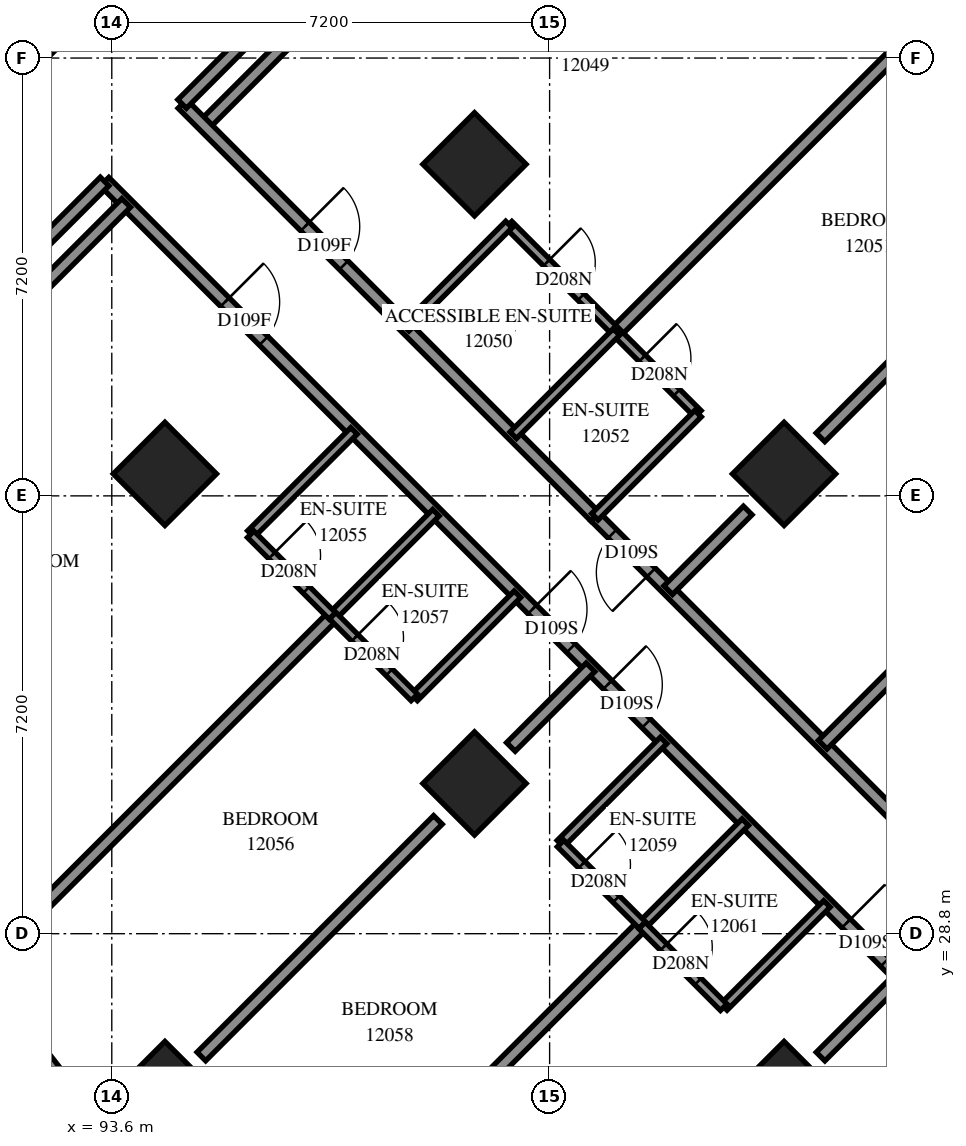
"""IFC4 building model, lengths in metres.
Left out: names, types, materials, properties, quantities, classifications, styles, units other than length and angle.
Written with IfcOpenShell. Run it as: python <this file> out.ifc"""

import sys

from ifc_helpers import new_model, si_unit, direction, frame, frame_2d, origin, origin_2d, place, context, subcontext, project, spatial, polyline, rectangle, outline, extrude, element, fill, save


model = new_model("IFC4")
c1 = context("Model", 3, precision=1e-05, world=origin(), true_north=direction((0.0, 1.0)))
c2 = subcontext(c1, "Body", "Model", "MODEL_VIEW")
j1 = project(units=[si_unit("LENGTHUNIT", "METRE"), si_unit("PLANEANGLEUNIT", "RADIAN")], contexts=[c1])
p1 = place(None, origin())
s1 = spatial("IfcSite", under=j1, at=p1, CompositionType="ELEMENT")
p2 = place(p1, origin())
s2 = spatial("IfcBuilding", under=s1, at=p2, CompositionType="ELEMENT")
p3 = place(p2, frame((0.0, 0.0, 47.4)))
s3 = spatial("IfcBuildingStorey", under=s2, at=p3, CompositionType="ELEMENT", Elevation=47.4)
for number, where, z_axis, x_axis in (
    (1, (99.565, 41.453, 0.0), (0.0, 0.0, 1.0), (0.707, -0.707, 0.0)),
    (2, (94.474, 36.362, 0.0), (0.0, 0.0, 1.0), (0.707, -0.707, 0.0)),
    (3, (104.656, 36.362, 0.0), (0.0, 0.0, 1.0), (0.707, -0.707, 0.0)),
    (4, (99.565, 31.271, 0.0), (0.0, 0.0, 1.0), (0.707, -0.707, 0.0)),
    (5, (94.474, 26.18, 0.0), (0.0, 0.0, 1.0), (0.707, -0.707, 0.0)),
    (6, (104.656, 26.18, 0.0), (0.0, 0.0, 1.0), (0.707, -0.707, 0.0)),
):
    element("IfcColumn", number, at=place(p3, frame(where, z_axis=z_axis, x_axis=x_axis)), inside=s3, PredefinedType="COLUMN", context=c2, shape_type="SweptSolid", body=[
        extrude(rectangle(XDim=1.2, YDim=1.2, at=origin_2d()), origin(), (0.0, 0.0, 1.0), 3.1),
    ])
p4 = place(p3, frame((87.19, 38.554, -0.3), z_axis=(0.0, 0.0, 1.0), x_axis=(0.707103309, 0.7071102534, 0.0)))
e7 = element("IfcWall", 7, at=p4, inside=s3, PredefinedType="SHEAR", context=c2, shape_type="SweptSolid", body=[
    extrude(rectangle(XDim=14.4, YDim=1.0, at=frame_2d((7.2, 0.0))), origin(), (0.0, 0.0, 1.0), 2.7),
])
p5 = place(p4, frame((4.55, 0.0, 0.3)))
e8 = element("IfcOpeningElement", 8, at=p5, cuts=e7, PredefinedType="OPENING", context=c2, shape_type="SweptSolid", body=[
    extrude(rectangle(XDim=1.1, YDim=2.1, at=frame_2d((0.55, 1.05))), frame((0.0, 0.51, 0.0), z_axis=(0.0, -1.0, 0.0), x_axis=(1.0, 0.0, 0.0)), (0.0, 0.0, 1.0), 1.02),
])
p6 = place(p4, frame((11.35, 0.0, 0.3)))
e9 = element("IfcOpeningElement", 9, at=p6, cuts=e7, PredefinedType="OPENING", context=c2, shape_type="SweptSolid", body=[
    extrude(rectangle(XDim=1.1, YDim=2.1, at=frame_2d((0.55, 1.05))), frame((0.0, 0.51, 0.0), z_axis=(0.0, -1.0, 0.0), x_axis=(1.0, 0.0, 0.0)), (0.0, 0.0, 1.0), 1.02),
])
p7 = place(p3, frame((91.16, 28.188, 0.0), z_axis=(0.0, 0.0, 1.0), x_axis=(0.614334374, -0.7890458015, 0.0)))
e10 = element("IfcWall", 10, at=p7, inside=s3, PredefinedType="SOLIDWALL", context=c2, shape_type="SweptSolid", body=[
    extrude(outline(polyline([(0.034, -0.275), (3.937, -0.275), (3.868, 0.275), (-0.034, 0.275), (0.034, -0.275)])), origin(), (0.0, 0.0, 1.0), 3.1),
])
p8 = place(p7, frame((0.534, 0.0, 0.5)))
e11 = element("IfcOpeningElement", 11, at=p8, cuts=e10, PredefinedType="OPENING", context=c2, shape_type="SweptSolid", body=[
    extrude(rectangle(XDim=2.8, YDim=2.45, at=frame_2d((1.4, 1.225))), frame((0.0, 0.285, 0.0), z_axis=(0.0, -1.0, 0.0), x_axis=(1.0, 0.0, 0.0)), (0.0, 0.0, 1.0), 0.57),
])
p9 = place(p3, frame((93.481, 41.167, 0.0), z_axis=(0.0, 0.0, 1.0), x_axis=(0.7071067812, -0.7071067812, 0.0)))
e12 = element("IfcWall", 12, at=p9, inside=s3, PredefinedType="PARTITIONING", context=c2, shape_type="SweptSolid", body=[
    extrude(rectangle(XDim=25.699, YDim=0.2, at=frame_2d((12.85, 0.0))), origin(), (0.0, 0.0, 1.0), 3.1),
])
p10 = place(p9, frame((2.8, 0.0, 0.0)))
e13 = element("IfcOpeningElement", 13, at=p10, cuts=e12, PredefinedType="OPENING", context=c2, shape_type="SweptSolid", body=[
    extrude(rectangle(XDim=0.9, YDim=2.1, at=frame_2d((0.45, 1.05))), frame((0.0, 0.11, 0.0), z_axis=(0.0, -1.0, 0.0), x_axis=(1.0, 0.0, 0.0)), (0.0, 0.0, 1.0), 0.22),
])
p11 = place(p9, frame((9.948, 0.0, 0.0)))
e14 = element("IfcOpeningElement", 14, at=p11, cuts=e12, PredefinedType="OPENING", context=c2, shape_type="SweptSolid", body=[
    extrude(rectangle(XDim=0.9, YDim=2.1, at=frame_2d((0.45, 1.05))), frame((0.0, 0.11, 0.0), z_axis=(0.0, -1.0, 0.0), x_axis=(1.0, 0.0, 0.0)), (0.0, 0.0, 1.0), 0.22),
])
p12 = place(p9, frame((11.7, 0.0, 0.0)))
e15 = element("IfcOpeningElement", 15, at=p12, cuts=e12, PredefinedType="OPENING", context=c2, shape_type="SweptSolid", body=[
    extrude(rectangle(XDim=0.9, YDim=2.1, at=frame_2d((0.45, 1.05))), frame((0.0, 0.11, 0.0), z_axis=(0.0, -1.0, 0.0), x_axis=(1.0, 0.0, 0.0)), (0.0, 0.0, 1.0), 0.22),
])
p13 = place(p9, frame((17.25, 0.0, 0.0)))
e16 = element("IfcOpeningElement", 16, at=p13, cuts=e12, PredefinedType="OPENING", context=c2, shape_type="SweptSolid", body=[
    extrude(rectangle(XDim=0.9, YDim=2.1, at=frame_2d((0.45, 1.05))), frame((0.0, 0.11, 0.0), z_axis=(0.0, -1.0, 0.0), x_axis=(1.0, 0.0, 0.0)), (0.0, 0.0, 1.0), 0.22),
])
p14 = place(p9, frame((22.82, 0.0, 0.0)))
e17 = element("IfcOpeningElement", 17, at=p14, cuts=e12, PredefinedType="OPENING", context=c2, shape_type="SweptSolid", body=[
    extrude(rectangle(XDim=0.9, YDim=2.1, at=frame_2d((0.45, 1.05))), frame((0.0, 0.11, 0.0), z_axis=(0.0, -1.0, 0.0), x_axis=(1.0, 0.0, 0.0)), (0.0, 0.0, 1.0), 0.22),
])
p15 = place(p3, frame((111.352, 25.855, 0.0), z_axis=(0.0, 0.0, 1.0), x_axis=(-0.7070418597, 0.7071716967, 0.0)))
e18 = element("IfcWall", 18, at=p15, inside=s3, PredefinedType="PARTITIONING", context=c2, shape_type="SweptSolid", body=[
    extrude(rectangle(XDim=13.864, YDim=0.2, at=frame_2d((6.932, 0.0))), origin(), (0.0, 0.0, 1.0), 3.1),
])
p16 = place(p15, frame((12.564, 0.0, 0.0)))
e19 = element("IfcOpeningElement", 19, at=p16, cuts=e18, PredefinedType="OPENING", context=c2, shape_type="SweptSolid", body=[
    extrude(rectangle(XDim=0.9, YDim=2.1, at=frame_2d((0.45, 1.05))), frame((0.0, 0.11, 0.0), z_axis=(0.0, -1.0, 0.0), x_axis=(1.0, 0.0, 0.0)), (0.0, 0.0, 1.0), 0.22),
])
p17 = place(p15, frame((5.19, 0.0, 0.0)))
e20 = element("IfcOpeningElement", 20, at=p17, cuts=e18, PredefinedType="OPENING", context=c2, shape_type="SweptSolid", body=[
    extrude(rectangle(XDim=1.0, YDim=2.1, at=frame_2d((0.5, 1.05))), frame((0.0, 0.11, 0.0), z_axis=(0.0, -1.0, 0.0), x_axis=(1.0, 0.0, 0.0)), (0.0, 0.0, 1.0), 0.22),
])
p18 = place(p3, frame((105.292, 31.908, 0.0), z_axis=(0.0, 0.0, 1.0), x_axis=(0.7071067812, 0.7071067812, 0.0)))
e21 = element("IfcWall", 21, at=p18, inside=s3, PredefinedType="PARTITIONING", context=c2, shape_type="SweptSolid", body=[
    extrude(rectangle(XDim=10.979, YDim=0.2, at=frame_2d((5.49, 0.0))), origin(), (0.0, 0.0, 1.0), 3.1),
])
p19 = place(p3, frame((95.109, 42.091, 0.0), z_axis=(0.0, 0.0, 1.0), x_axis=(0.7071113741, 0.7071021882, 0.0)))
e22 = element("IfcWall", 22, at=p19, inside=s3, PredefinedType="PARTITIONING", context=c2, shape_type="SweptSolid", body=[
    extrude(rectangle(XDim=10.886, YDim=0.2, at=frame_2d((5.443, 0.0))), origin(), (0.0, 0.0, 1.0), 3.1),
])
p20 = place(p3, frame((86.317, 33.298, 0.0), z_axis=(0.0, 0.0, 1.0), x_axis=(0.7071020793, 0.7071114831, 0.0)))
e23 = element("IfcWall", 23, at=p20, inside=s3, PredefinedType="PARTITIONING", context=c2, shape_type="SweptSolid", body=[
    extrude(rectangle(XDim=10.634, YDim=0.2, at=frame_2d((5.317, 0.0))), origin(), (0.0, 0.0, 1.0), 3.1),
])
p21 = place(p3, frame((94.761, 42.446, 0.0), z_axis=(0.0, 0.0, 1.0), x_axis=(0.7071067812, -0.7071067812, 0.0)))
e24 = element("IfcWall", 24, at=p21, inside=s3, PredefinedType="PARTITIONING", context=c2, shape_type="SweptSolid", body=[
    extrude(rectangle(XDim=9.597, YDim=0.2, at=frame_2d((4.798, 0.0))), origin(), (0.0, 0.0, 1.0), 3.1),
])
p22 = place(p21, frame((2.851, 0.0, 0.0)))
e25 = element("IfcOpeningElement", 25, at=p22, cuts=e24, PredefinedType="OPENING", context=c2, shape_type="SweptSolid", body=[
    extrude(rectangle(XDim=0.9, YDim=2.1, at=frame_2d((0.45, 1.05))), frame((0.0, 0.11, 0.0), z_axis=(0.0, -1.0, 0.0), x_axis=(1.0, 0.0, 0.0)), (0.0, 0.0, 1.0), 0.22),
])
for number, where, z_axis, x_axis in (
    (26, (86.836, 34.524, 0.0), (0.0, 0.0, 1.0), (0.707, 0.707, 0.0)),
    (27, (94.757, 42.445, 0.0), (0.0, 0.0, 1.0), (0.707, 0.707, 0.0)),
):
    element("IfcWall", number, at=place(p3, frame(where, z_axis=z_axis, x_axis=x_axis)), inside=s3, PredefinedType="PARTITIONING", context=c2, shape_type="SweptSolid", body=[
        extrude(rectangle(XDim=9.399, YDim=0.2, at=frame_2d((4.699, 0.0))), origin(), (0.0, 0.0, 1.0), 3.1),
    ])
p23 = place(p3, frame((101.896, 38.698, 0.0), z_axis=(0.0, 0.0, 1.0), x_axis=(0.7072298261, 0.7069837149, 0.0)))
e28 = element("IfcWall", 28, at=p23, inside=s3, PredefinedType="PARTITIONING", context=c2, shape_type="SweptSolid", body=[
    extrude(rectangle(XDim=8.533, YDim=0.2, at=frame_2d((4.266, 0.0))), origin(), (0.0, 0.0, 1.0), 3.1),
])
p24 = place(p3, frame((96.528, 23.144, 0.0), z_axis=(0.0, 0.0, 1.0), x_axis=(0.7071067812, 0.7071067812, 0.0)))
e29 = element("IfcWall", 29, at=p24, inside=s3, PredefinedType="PARTITIONING", context=c2, shape_type="SweptSolid", body=[
    extrude(rectangle(XDim=8.195, YDim=0.2, at=frame_2d((4.098, 0.0))), origin(), (0.0, 0.0, 1.0), 3.1),
])
p25 = place(p3, frame((91.459, 28.251, 0.0), z_axis=(0.0, 0.0, 1.0), x_axis=(0.7072292176, 0.7069843236, 0.0)))
e30 = element("IfcWall", 30, at=p25, inside=s3, PredefinedType="PARTITIONING", context=c2, shape_type="SweptSolid", body=[
    extrude(rectangle(XDim=8.167, YDim=0.2, at=frame_2d((4.083, 0.0))), origin(), (0.0, 0.0, 1.0), 3.1),
])
p26 = place(p3, frame((105.255, 36.963, 0.0), z_axis=(0.0, 0.0, 1.0), x_axis=(0.7071067812, 0.7071067812, 0.0)))
e31 = element("IfcWall", 31, at=p26, inside=s3, PredefinedType="PARTITIONING", context=c2, shape_type="SweptSolid", body=[
    extrude(rectangle(XDim=5.504, YDim=0.2, at=frame_2d((2.752, 0.0))), origin(), (0.0, 0.0, 1.0), 3.1),
])
p27 = place(p3, frame((95.073, 26.781, 0.0), z_axis=(0.0, 0.0, 1.0), x_axis=(0.7071067812, 0.7071067812, 0.0)))
e32 = element("IfcWall", 32, at=p27, inside=s3, PredefinedType="PARTITIONING", context=c2, shape_type="SweptSolid", body=[
    extrude(rectangle(XDim=5.501, YDim=0.2, at=frame_2d((2.751, 0.0))), origin(), (0.0, 0.0, 1.0), 3.1),
])
p28 = place(p3, frame((100.126, 40.461, 0.0), z_axis=(0.0, 0.0, 1.0), x_axis=(0.7071067812, -0.7071067812, 0.0)))
e33 = element("IfcWall", 33, at=p28, inside=s3, PredefinedType="PARTITIONING", context=c2, shape_type="SweptSolid", body=[
    extrude(rectangle(XDim=4.401, YDim=0.15, at=frame_2d((2.2, 0.0))), origin(), (0.0, 0.0, 1.0), 3.1),
])
p29 = place(p28, frame((0.883, 0.0, 0.0)))
e34 = element("IfcOpeningElement", 34, at=p29, cuts=e33, PredefinedType="OPENING", context=c2, shape_type="SweptSolid", body=[
    extrude(rectangle(XDim=0.8, YDim=2.1, at=frame_2d((0.4, 1.05))), frame((0.0, 0.085, 0.0), z_axis=(0.0, -1.0, 0.0), x_axis=(1.0, 0.0, 0.0)), (0.0, 0.0, 1.0), 0.17),
])
p30 = place(p28, frame((3.108, 0.0, 0.0)))
e35 = element("IfcOpeningElement", 35, at=p30, cuts=e33, PredefinedType="OPENING", context=c2, shape_type="SweptSolid", body=[
    extrude(rectangle(XDim=0.8, YDim=2.1, at=frame_2d((0.4, 1.05))), frame((0.0, 0.085, 0.0), z_axis=(0.0, -1.0, 0.0), x_axis=(1.0, 0.0, 0.0)), (0.0, 0.0, 1.0), 0.17),
])
for number, where, z_axis, x_axis in (
    (36, (100.977, 30.281, 0.0), (0.0, 0.0, 1.0), (0.707, 0.707, 0.0)),
    (37, (98.573, 32.685, 0.0), (0.0, 0.0, 1.0), (0.707, 0.707, 0.0)),
):
    element("IfcWall", number, at=place(p3, frame(where, z_axis=z_axis, x_axis=x_axis)), inside=s3, PredefinedType="PARTITIONING", context=c2, shape_type="SweptSolid", body=[
        extrude(rectangle(XDim=2.401, YDim=0.15, at=frame_2d((1.201, 0.0))), origin(), (0.0, 0.0, 1.0), 3.1),
    ])
for number, where, z_axis, x_axis in (
    (38, (105.578, 25.682, 0.0), (0.0, 0.0, 1.0), (0.707, 0.708, 0.0)),
    (39, (97.234, 34.026, 0.0), (0.0, 0.0, 1.0), (0.707, 0.708, 0.0)),
    (40, (98.435, 38.765, 0.0), (0.0, 0.0, 1.0), (0.707, 0.708, 0.0)),
    (41, (100.203, 36.997, 0.0), (0.0, 0.0, 1.0), (0.707, 0.708, 0.0)),
):
    element("IfcWall", number, at=place(p3, frame(where, z_axis=z_axis, x_axis=x_axis)), inside=s3, PredefinedType="PARTITIONING", context=c2, shape_type="SweptSolid", body=[
        extrude(rectangle(XDim=2.4, YDim=0.15, at=frame_2d((1.2, 0.0))), origin(), (0.0, 0.0, 1.0), 3.1),
    ])
for number, where, z_axis, x_axis in (
    (42, (95.887, 35.373, 0.0), (0.0, 0.0, 1.0), (0.707, 0.707, 0.0)),
    (43, (101.545, 35.657, 0.0), (0.0, 0.0, 1.0), (0.707, 0.707, 0.0)),
    (44, (102.323, 28.939, 0.0), (0.0, 0.0, 1.0), (0.707, 0.707, 0.0)),
    (45, (103.665, 27.595, 0.0), (0.0, 0.0, 1.0), (0.707, 0.707, 0.0)),
):
    element("IfcWall", number, at=place(p3, frame(where, z_axis=z_axis, x_axis=x_axis)), inside=s3, PredefinedType="PARTITIONING", context=c2, shape_type="SweptSolid", body=[
        extrude(rectangle(XDim=2.398, YDim=0.15, at=frame_2d((1.199, 0.0))), origin(), (0.0, 0.0, 1.0), 3.1),
    ])
p31 = place(p3, frame((95.885, 35.369, 0.0), z_axis=(0.0, 0.0, 1.0), x_axis=(0.7071067812, -0.7071067812, 0.0)))
e46 = element("IfcWall", 46, at=p31, inside=s3, PredefinedType="PARTITIONING", context=c2, shape_type="SweptSolid", body=[
    extrude(rectangle(XDim=1.901, YDim=0.15, at=frame_2d((0.95, 0.0))), origin(), (0.0, 0.0, 1.0), 3.1),
])
p32 = place(p31, frame((0.493, 0.0, 0.0)))
e47 = element("IfcOpeningElement", 47, at=p32, cuts=e46, PredefinedType="OPENING", context=c2, shape_type="SweptSolid", body=[
    extrude(rectangle(XDim=0.8, YDim=2.1, at=frame_2d((0.4, 1.05))), frame((0.0, 0.085, 0.0), z_axis=(0.0, -1.0, 0.0), x_axis=(1.0, 0.0, 0.0)), (0.0, 0.0, 1.0), 0.17),
])
p33 = place(p3, frame((100.981, 30.283, 0.0), z_axis=(0.0, 0.0, 1.0), x_axis=(0.7076330979, -0.7065800724, 0.0)))
e48 = element("IfcWall", 48, at=p33, inside=s3, PredefinedType="PARTITIONING", context=c2, shape_type="SweptSolid", body=[
    extrude(rectangle(XDim=1.899, YDim=0.15, at=frame_2d((0.95, 0.0))), origin(), (0.0, 0.0, 1.0), 3.1),
])
p34 = place(p33, frame((0.493, 0.0, 0.0)))
e49 = element("IfcOpeningElement", 49, at=p34, cuts=e48, PredefinedType="OPENING", context=c2, shape_type="SweptSolid", body=[
    extrude(rectangle(XDim=0.8, YDim=2.1, at=frame_2d((0.4, 1.05))), frame((0.0, 0.085, 0.0), z_axis=(0.0, -1.0, 0.0), x_axis=(1.0, 0.0, 0.0)), (0.0, 0.0, 1.0), 0.17),
])
p35 = place(p3, frame((97.233, 34.029, 0.0), z_axis=(0.0, 0.0, 1.0), x_axis=(0.7065800724, -0.7076330979, 0.0)))
e50 = element("IfcWall", 50, at=p35, inside=s3, PredefinedType="PARTITIONING", context=c2, shape_type="SweptSolid", body=[
    extrude(rectangle(XDim=1.899, YDim=0.15, at=frame_2d((0.95, 0.0))), origin(), (0.0, 0.0, 1.0), 3.1),
])
p36 = place(p35, frame((0.515, 0.0, 0.0)))
e51 = element("IfcOpeningElement", 51, at=p36, cuts=e50, PredefinedType="OPENING", context=c2, shape_type="SweptSolid", body=[
    extrude(rectangle(XDim=0.8, YDim=2.1, at=frame_2d((0.4, 1.05))), frame((0.0, 0.085, 0.0), z_axis=(0.0, -1.0, 0.0), x_axis=(1.0, 0.0, 0.0)), (0.0, 0.0, 1.0), 0.17),
])
p37 = place(p3, frame((102.321, 28.935, 0.0), z_axis=(0.0, 0.0, 1.0), x_axis=(0.7065800724, -0.7076330979, 0.0)))
e52 = element("IfcWall", 52, at=p37, inside=s3, PredefinedType="PARTITIONING", context=c2, shape_type="SweptSolid", body=[
    extrude(rectangle(XDim=1.899, YDim=0.15, at=frame_2d((0.95, 0.0))), origin(), (0.0, 0.0, 1.0), 3.1),
])
p38 = place(p37, frame((0.501, 0.0, 0.0)))
e53 = element("IfcOpeningElement", 53, at=p38, cuts=e52, PredefinedType="OPENING", context=c2, shape_type="SweptSolid", body=[
    extrude(rectangle(XDim=0.8, YDim=2.1, at=frame_2d((0.4, 1.05))), frame((0.0, 0.085, 0.0), z_axis=(0.0, -1.0, 0.0), x_axis=(1.0, 0.0, 0.0)), (0.0, 0.0, 1.0), 0.17),
])
p39 = place(p3, frame((100.163, 31.871, 0.0), z_axis=(0.0, 0.0, 1.0), x_axis=(0.7071067812, 0.7071067812, 0.0)))
e54 = element("IfcWall", 54, at=p39, inside=s3, PredefinedType="PARTITIONING", context=c2, shape_type="SweptSolid", body=[
    extrude(rectangle(XDim=1.853, YDim=0.2, at=frame_2d((0.926, 0.0))), origin(), (0.0, 0.0, 1.0), 3.1),
])
for number, where, z_axis, x_axis in (
    (55, (105.256, 26.78, 0.0), (0.0, 0.0, 1.0), (0.708, 0.707, 0.0)),
    (56, (102.75, 34.45, 0.0), (0.0, 0.0, 1.0), (0.707, 0.708, 0.0)),
):
    element("IfcWall", number, at=place(p3, frame(where, z_axis=z_axis, x_axis=x_axis)), inside=s3, PredefinedType="PARTITIONING", context=c2, shape_type="SweptSolid", body=[
        extrude(rectangle(XDim=1.851, YDim=0.2, at=frame_2d((0.926, 0.0))), origin(), (0.0, 0.0, 1.0), 3.1),
    ])
p40 = place(p8, origin())
e57 = element("IfcWindow", 57, at=p40, inside=s3, PartitioningType="SINGLE_PANEL", PredefinedType="WINDOW", context=c2, shape_type="SweptSolid", body=[
    extrude(rectangle(XDim=2.8, YDim=2.45, at=frame_2d((1.4, 1.225))), frame((0.0, 0.155, 0.0), z_axis=(0.0, -1.0, 0.0), x_axis=(1.0, 0.0, 0.0)), (0.0, 0.0, 1.0), 0.06),
])
fill(e11, e57)
p41 = place(p22, origin())
e58 = element("IfcDoor", 58, at=p41, inside=s3, OperationType="SINGLE_SWING_RIGHT", PredefinedType="DOOR", context=c2, shape_type="SweptSolid", body=[
    extrude(rectangle(XDim=0.9, YDim=2.1, at=frame_2d((0.45, 1.05))), frame((0.0, 0.025, 0.0), z_axis=(0.0, -1.0, 0.0), x_axis=(1.0, 0.0, 0.0)), (0.0, 0.0, 1.0), 0.05),
])
fill(e25, e58)
p42 = place(p29, origin())
e59 = element("IfcDoor", 59, at=p42, inside=s3, OperationType="SINGLE_SWING_RIGHT", PredefinedType="DOOR", context=c2, shape_type="SweptSolid", body=[
    extrude(rectangle(XDim=0.8, YDim=2.1, at=frame_2d((0.4, 1.05))), frame((0.0, 0.025, 0.0), z_axis=(0.0, -1.0, 0.0), x_axis=(1.0, 0.0, 0.0)), (0.0, 0.0, 1.0), 0.05),
])
fill(e34, e59)
p43 = place(p16, origin())
e60 = element("IfcDoor", 60, at=p43, inside=s3, OperationType="SINGLE_SWING_RIGHT", PredefinedType="DOOR", context=c2, shape_type="SweptSolid", body=[
    extrude(rectangle(XDim=0.9, YDim=2.1, at=frame_2d((0.45, 1.05))), frame((0.0, 0.025, 0.0), z_axis=(0.0, -1.0, 0.0), x_axis=(1.0, 0.0, 0.0)), (0.0, 0.0, 1.0), 0.05),
])
fill(e19, e60)
p44 = place(p30, origin())
e61 = element("IfcDoor", 61, at=p44, inside=s3, OperationType="SINGLE_SWING_RIGHT", PredefinedType="DOOR", context=c2, shape_type="SweptSolid", body=[
    extrude(rectangle(XDim=0.8, YDim=2.1, at=frame_2d((0.4, 1.05))), frame((0.0, 0.025, 0.0), z_axis=(0.0, -1.0, 0.0), x_axis=(1.0, 0.0, 0.0)), (0.0, 0.0, 1.0), 0.05),
])
fill(e35, e61)
p45 = place(p10, origin())
e62 = element("IfcDoor", 62, at=p45, inside=s3, OperationType="SINGLE_SWING_LEFT", PredefinedType="DOOR", context=c2, shape_type="SweptSolid", body=[
    extrude(rectangle(XDim=0.9, YDim=2.1, at=frame_2d((0.45, 1.05))), frame((0.0, 0.025, 0.0), z_axis=(0.0, -1.0, 0.0), x_axis=(1.0, 0.0, 0.0)), (0.0, 0.0, 1.0), 0.05),
])
fill(e13, e62)
p46 = place(p32, origin())
e63 = element("IfcDoor", 63, at=p46, inside=s3, OperationType="SINGLE_SWING_RIGHT", PredefinedType="DOOR", context=c2, shape_type="SweptSolid", body=[
    extrude(rectangle(XDim=0.8, YDim=2.1, at=frame_2d((0.4, 1.05))), frame((0.0, 0.025, 0.0), z_axis=(0.0, -1.0, 0.0), x_axis=(1.0, 0.0, 0.0)), (0.0, 0.0, 1.0), 0.05),
])
fill(e47, e63)
p47 = place(p11, origin())
e64 = element("IfcDoor", 64, at=p47, inside=s3, OperationType="SINGLE_SWING_LEFT", PredefinedType="DOOR", context=c2, shape_type="SweptSolid", body=[
    extrude(rectangle(XDim=0.9, YDim=2.1, at=frame_2d((0.45, 1.05))), frame((0.0, 0.025, 0.0), z_axis=(0.0, -1.0, 0.0), x_axis=(1.0, 0.0, 0.0)), (0.0, 0.0, 1.0), 0.05),
])
fill(e14, e64)
p48 = place(p36, origin())
e65 = element("IfcDoor", 65, at=p48, inside=s3, OperationType="SINGLE_SWING_RIGHT", PredefinedType="DOOR", context=c2, shape_type="SweptSolid", body=[
    extrude(rectangle(XDim=0.8, YDim=2.1, at=frame_2d((0.4, 1.05))), frame((0.0, 0.025, 0.0), z_axis=(0.0, -1.0, 0.0), x_axis=(1.0, 0.0, 0.0)), (0.0, 0.0, 1.0), 0.05),
])
fill(e51, e65)
p49 = place(p12, origin())
e66 = element("IfcDoor", 66, at=p49, inside=s3, OperationType="SINGLE_SWING_RIGHT", PredefinedType="DOOR", context=c2, shape_type="SweptSolid", body=[
    extrude(rectangle(XDim=0.9, YDim=2.1, at=frame_2d((0.45, 1.05))), frame((0.0, 0.025, 0.0), z_axis=(0.0, -1.0, 0.0), x_axis=(1.0, 0.0, 0.0)), (0.0, 0.0, 1.0), 0.05),
])
fill(e15, e66)
p50 = place(p34, origin())
e67 = element("IfcDoor", 67, at=p50, inside=s3, OperationType="SINGLE_SWING_RIGHT", PredefinedType="DOOR", context=c2, shape_type="SweptSolid", body=[
    extrude(rectangle(XDim=0.8, YDim=2.1, at=frame_2d((0.4, 1.05))), frame((0.0, 0.025, 0.0), z_axis=(0.0, -1.0, 0.0), x_axis=(1.0, 0.0, 0.0)), (0.0, 0.0, 1.0), 0.05),
])
fill(e49, e67)
p51 = place(p13, origin())
e68 = element("IfcDoor", 68, at=p51, inside=s3, OperationType="SINGLE_SWING_LEFT", PredefinedType="DOOR", context=c2, shape_type="SweptSolid", body=[
    extrude(rectangle(XDim=0.9, YDim=2.1, at=frame_2d((0.45, 1.05))), frame((0.0, 0.025, 0.0), z_axis=(0.0, -1.0, 0.0), x_axis=(1.0, 0.0, 0.0)), (0.0, 0.0, 1.0), 0.05),
])
fill(e16, e68)
p52 = place(p38, origin())
e69 = element("IfcDoor", 69, at=p52, inside=s3, OperationType="SINGLE_SWING_RIGHT", PredefinedType="DOOR", context=c2, shape_type="SweptSolid", body=[
    extrude(rectangle(XDim=0.8, YDim=2.1, at=frame_2d((0.4, 1.05))), frame((0.0, 0.025, 0.0), z_axis=(0.0, -1.0, 0.0), x_axis=(1.0, 0.0, 0.0)), (0.0, 0.0, 1.0), 0.05),
])
fill(e53, e69)
save(model, sys.argv[1])
